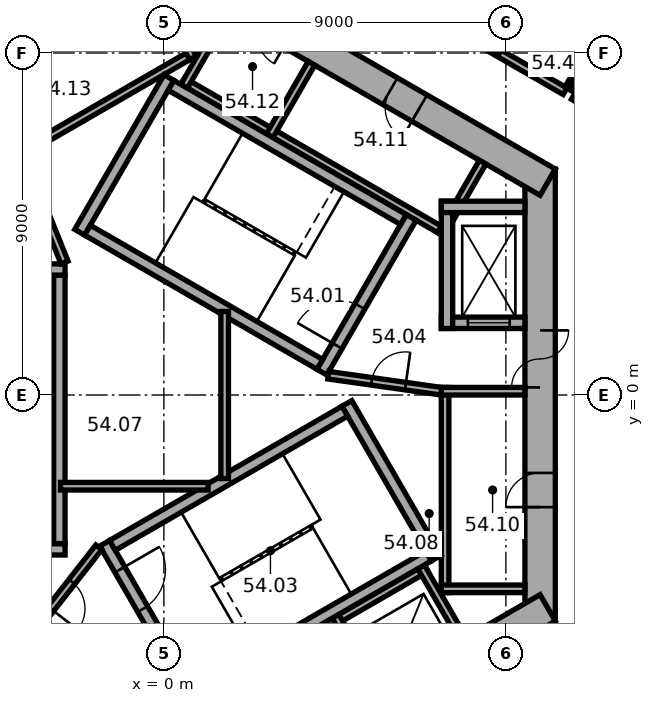
"""IFC4 building model, lengths in metres.
Left out: names, types, materials, properties, quantities, classifications, styles, units other than length and angle.
Written with IfcOpenShell. Run it as: python <this file> out.ifc"""

import sys

from ifc_helpers import new_model, si_unit, direction, frame, frame_2d, origin, place, context, subcontext, project, spatial, rectangle, extrude, element, fill, save


model = new_model("IFC4")
c1 = context("Model", 3, precision=1e-05, world=origin(), true_north=direction((0.0, 1.0)))
c2 = subcontext(c1, "Body", "Model", "MODEL_VIEW")
j1 = project(units=[si_unit("LENGTHUNIT", "METRE"), si_unit("PLANEANGLEUNIT", "RADIAN")], contexts=[c1])
p1 = place(None, origin())
s1 = spatial("IfcSite", under=j1, at=p1, CompositionType="ELEMENT")
p2 = place(p1, origin())
s2 = spatial("IfcBuilding", under=s1, at=p2, CompositionType="ELEMENT")
p3 = place(p2, frame((0.0, 0.0, 221.7)))
s3 = spatial("IfcBuildingStorey", under=s2, at=p3, CompositionType="ELEMENT", Elevation=221.7)
p4 = place(p3, frame((9.9, -5.947, 0.0), z_axis=(0.0, 0.0, 1.0), x_axis=(0.0, 1.0, 0.0)))
e1 = element("IfcWall", 1, at=p4, inside=s3, PredefinedType="SHEAR", context=c2, shape_type="SweptSolid", body=[
    extrude(rectangle(XDim=11.894, YDim=0.8, at=frame_2d((5.947, 0.0))), origin(), (0.0, 0.0, 1.0), 3.7),
])
p5 = place(p4, frame((6.147, 0.0, 0.0)))
e2 = element("IfcOpeningElement", 2, at=p5, cuts=e1, PredefinedType="OPENING", context=c2, shape_type="SweptSolid", body=[
    extrude(rectangle(XDim=1.5, YDim=2.1, at=frame_2d((0.75, 1.05))), frame((0.0, 0.41, 0.0), z_axis=(0.0, -1.0, 0.0), x_axis=(1.0, 0.0, 0.0)), (0.0, 0.0, 1.0), 0.82),
])
p6 = place(p4, frame((2.997, 0.0, 0.0)))
e3 = element("IfcOpeningElement", 3, at=p6, cuts=e1, PredefinedType="OPENING", context=c2, shape_type="SweptSolid", body=[
    extrude(rectangle(XDim=0.9, YDim=2.1, at=frame_2d((0.45, 1.05))), frame((0.0, 0.41, 0.0), z_axis=(0.0, -1.0, 0.0), x_axis=(1.0, 0.0, 0.0)), (0.0, 0.0, 1.0), 0.82),
])
p7 = place(p3, frame((10.1, 5.6, 0.0), z_axis=(0.0, 0.0, 1.0), x_axis=(-0.866023897231, 0.500002609418, 0.0)))
e4 = element("IfcWall", 4, at=p7, inside=s3, PredefinedType="SHEAR", context=c2, shape_type="SweptSolid", body=[
    extrude(rectangle(XDim=11.894, YDim=0.8, at=frame_2d((5.947, 0.0))), origin(), (0.0, 0.0, 1.0), 3.7),
])
p8 = place(p7, frame((3.897, 0.0, 0.0)))
e5 = element("IfcOpeningElement", 5, at=p8, cuts=e4, PredefinedType="OPENING", context=c2, shape_type="SweptSolid", body=[
    extrude(rectangle(XDim=0.9, YDim=2.1, at=frame_2d((0.45, 1.05))), frame((0.0, 0.41, 0.0), z_axis=(0.0, -1.0, 0.0), x_axis=(1.0, 0.0, 0.0)), (0.0, 0.0, 1.0), 0.82),
])
p9 = place(p7, frame((7.797, 0.0, 0.0)))
e6 = element("IfcOpeningElement", 6, at=p9, cuts=e4, PredefinedType="OPENING", context=c2, shape_type="SweptSolid", body=[
    extrude(rectangle(XDim=0.9, YDim=2.1, at=frame_2d((0.45, 1.05))), frame((0.0, 0.41, 0.0), z_axis=(0.0, -1.0, 0.0), x_axis=(1.0, 0.0, 0.0)), (0.0, 0.0, 1.0), 0.82),
])
p10 = place(p3, frame((0.2, 11.547, 0.0), z_axis=(0.0, 0.0, 1.0), x_axis=(-0.866023897231, -0.500002609418, 0.0)))
e7 = element("IfcWall", 7, at=p10, inside=s3, PredefinedType="SHEAR", context=c2, shape_type="SweptSolid", body=[
    extrude(rectangle(XDim=11.894, YDim=0.8, at=frame_2d((5.947, 0.0))), origin(), (0.0, 0.0, 1.0), 3.7),
])
p11 = place(p10, frame((6.147, 0.0, 0.0)))
e8 = element("IfcOpeningElement", 8, at=p11, cuts=e7, PredefinedType="OPENING", context=c2, shape_type="SweptSolid", body=[
    extrude(rectangle(XDim=1.5, YDim=2.1, at=frame_2d((0.75, 1.05))), frame((0.0, 0.41, 0.0), z_axis=(0.0, -1.0, 0.0), x_axis=(1.0, 0.0, 0.0)), (0.0, 0.0, 1.0), 0.82),
])
p12 = place(p10, frame((2.997, 0.0, 0.0)))
e9 = element("IfcOpeningElement", 9, at=p12, cuts=e7, PredefinedType="OPENING", context=c2, shape_type="SweptSolid", body=[
    extrude(rectangle(XDim=0.9, YDim=2.1, at=frame_2d((0.45, 1.05))), frame((0.0, 0.41, 0.0), z_axis=(0.0, -1.0, 0.0), x_axis=(1.0, 0.0, 0.0)), (0.0, 0.0, 1.0), 0.82),
])
p13 = place(p3, frame((-10.1, -5.6, 0.0), z_axis=(0.0, 0.0, 1.0), x_axis=(0.866023897231, -0.500002609418, 0.0)))
e10 = element("IfcWall", 10, at=p13, inside=s3, PredefinedType="SHEAR", context=c2, shape_type="SweptSolid", body=[
    extrude(rectangle(XDim=11.894, YDim=0.8, at=frame_2d((5.947, 0.0))), origin(), (0.0, 0.0, 1.0), 3.7),
])
p14 = place(p13, frame((6.147, 0.0, 0.0)))
e11 = element("IfcOpeningElement", 11, at=p14, cuts=e10, PredefinedType="OPENING", context=c2, shape_type="SweptSolid", body=[
    extrude(rectangle(XDim=1.5, YDim=2.1, at=frame_2d((0.75, 1.05))), frame((0.0, 0.41, 0.0), z_axis=(0.0, -1.0, 0.0), x_axis=(1.0, 0.0, 0.0)), (0.0, 0.0, 1.0), 0.82),
])
p15 = place(p13, frame((1.597, 0.0, 0.0)))
e12 = element("IfcOpeningElement", 12, at=p15, cuts=e10, PredefinedType="OPENING", context=c2, shape_type="SweptSolid", body=[
    extrude(rectangle(XDim=1.1, YDim=2.1, at=frame_2d((0.55, 1.05))), frame((0.0, 0.41, 0.0), z_axis=(0.0, -1.0, 0.0), x_axis=(1.0, 0.0, 0.0)), (0.0, 0.0, 1.0), 0.82),
])
p16 = place(p13, frame((4.197, 0.0, 0.0)))
e13 = element("IfcOpeningElement", 13, at=p16, cuts=e10, PredefinedType="OPENING", context=c2, shape_type="SweptSolid", body=[
    extrude(rectangle(XDim=1.1, YDim=2.1, at=frame_2d((0.55, 1.05))), frame((0.0, 0.41, 0.0), z_axis=(0.0, -1.0, 0.0), x_axis=(1.0, 0.0, 0.0)), (0.0, 0.0, 1.0), 0.82),
])
p17 = place(p3, frame((-0.2, -11.547, 0.0), z_axis=(0.0, 0.0, 1.0), x_axis=(0.866023897231, 0.500002609418, 0.0)))
e14 = element("IfcWall", 14, at=p17, inside=s3, PredefinedType="SHEAR", context=c2, shape_type="SweptSolid", body=[
    extrude(rectangle(XDim=11.894, YDim=0.8, at=frame_2d((5.947, 0.0))), origin(), (0.0, 0.0, 1.0), 3.7),
])
p18 = place(p17, frame((2.497, 0.0, 0.0)))
e15 = element("IfcOpeningElement", 15, at=p18, cuts=e14, PredefinedType="OPENING", context=c2, shape_type="SweptSolid", body=[
    extrude(rectangle(XDim=1.1, YDim=2.1, at=frame_2d((0.55, 1.05))), frame((0.0, 0.41, 0.0), z_axis=(0.0, -1.0, 0.0), x_axis=(1.0, 0.0, 0.0)), (0.0, 0.0, 1.0), 0.82),
])
p19 = place(p17, frame((5.097, 0.0, 0.0)))
e16 = element("IfcOpeningElement", 16, at=p19, cuts=e14, PredefinedType="OPENING", context=c2, shape_type="SweptSolid", body=[
    extrude(rectangle(XDim=1.1, YDim=2.1, at=frame_2d((0.55, 1.05))), frame((0.0, 0.41, 0.0), z_axis=(0.0, -1.0, 0.0), x_axis=(1.0, 0.0, 0.0)), (0.0, 0.0, 1.0), 0.82),
])
p20 = place(p17, frame((7.697, 0.0, 0.0)))
e17 = element("IfcOpeningElement", 17, at=p20, cuts=e14, PredefinedType="OPENING", context=c2, shape_type="SweptSolid", body=[
    extrude(rectangle(XDim=1.1, YDim=2.1, at=frame_2d((0.55, 1.05))), frame((0.0, 0.41, 0.0), z_axis=(0.0, -1.0, 0.0), x_axis=(1.0, 0.0, 0.0)), (0.0, 0.0, 1.0), 0.82),
])
p21 = place(p3, frame((7.4, -5.2, 0.0), z_axis=(0.0, 0.0, 1.0), x_axis=(0.0, 1.0, 0.0)))
e18 = element("IfcWall", 18, at=p21, inside=s3, PredefinedType="PARTITIONING", context=c2, shape_type="SweptSolid", body=[
    extrude(rectangle(XDim=5.4, YDim=0.2, at=frame_2d((2.7, 0.0))), origin(), (0.0, 0.0, 1.0), 3.42),
])
for number, where, z_axis, x_axis in (
    (19, (7.3, -5.1, 0.0), (0.0, 0.0, 1.0), (1.0, 0.0, 0.0)),
    (20, (7.3, 0.1, 0.0), (0.0, 0.0, 1.0), (1.0, 0.0, 0.0)),
):
    element("IfcWall", number, at=place(p3, frame(where, z_axis=z_axis, x_axis=x_axis)), inside=s3, PredefinedType="PARTITIONING", context=c2, shape_type="SweptSolid", body=[
        extrude(rectangle(XDim=2.2, YDim=0.2, at=frame_2d((1.1, 0.0))), origin(), (0.0, 0.0, 1.0), 3.42),
    ])
p22 = place(p3, frame((7.424, 4.259, 0.0), z_axis=(0.0, 0.0, 1.0), x_axis=(-0.866026010844, 0.49999894854, 0.0)))
e21 = element("IfcWall", 21, at=p22, inside=s3, PredefinedType="PARTITIONING", context=c2, shape_type="SweptSolid", body=[
    extrude(rectangle(XDim=8.0, YDim=0.2, at=frame_2d((4.0, 0.0))), origin(), (0.0, 0.0, 1.0), 3.42),
])
for number, where, z_axis, x_axis in (
    (22, (7.287, 4.222, 0.0), (0.0, 0.0, 1.0), (0.5, 0.866, 0.0)),
    (23, (2.784, 6.822, 0.0), (0.0, 0.0, 1.0), (0.5, 0.866, 0.0)),
    (24, (0.532, 8.122, 0.0), (0.0, 0.0, 1.0), (0.5, 0.866, 0.0)),
):
    element("IfcWall", number, at=place(p3, frame(where, z_axis=z_axis, x_axis=x_axis)), inside=s3, PredefinedType="PARTITIONING", context=c2, shape_type="SweptSolid", body=[
        extrude(rectangle(XDim=2.2, YDim=0.2, at=frame_2d((1.1, 0.0))), origin(), (0.0, 0.0, 1.0), 3.42),
    ])
p23 = place(p3, frame((0.803, 9.009, 0.0), z_axis=(0.0, 0.0, 1.0), x_axis=(-0.866028230842, -0.499995103361, 0.0)))
e25 = element("IfcWall", 25, at=p23, inside=s3, PredefinedType="PARTITIONING", context=c2, shape_type="SweptSolid", body=[
    extrude(rectangle(XDim=5.4, YDim=0.2, at=frame_2d((2.7, 0.0))), origin(), (0.0, 0.0, 1.0), 3.42),
])
p24 = place(p3, frame((0.767, 8.872, 0.0), z_axis=(0.0, 0.0, 1.0), x_axis=(-0.499994660107, 0.866028486751, 0.0)))
e26 = element("IfcWall", 26, at=p24, inside=s3, PredefinedType="PARTITIONING", context=c2, shape_type="SweptSolid", body=[
    extrude(rectangle(XDim=2.2, YDim=0.2, at=frame_2d((1.1, 0.0))), origin(), (0.0, 0.0, 1.0), 3.42),
])
p25 = place(p3, frame((-0.024, -8.559, 0.0), z_axis=(0.0, 0.0, 1.0), x_axis=(0.866026010844, 0.49999894854, 0.0)))
e27 = element("IfcWall", 27, at=p25, inside=s3, PredefinedType="PARTITIONING", context=c2, shape_type="SweptSolid", body=[
    extrude(rectangle(XDim=8.0, YDim=0.2, at=frame_2d((4.0, 0.0))), origin(), (0.0, 0.0, 1.0), 3.42),
])
for number, where, z_axis, x_axis in (
    (28, (4.516, -5.822, 0.0), (0.0, 0.0, 1.0), (0.5, -0.866, 0.0)),
    (29, (6.768, -4.522, 0.0), (0.0, 0.0, 1.0), (0.5, -0.866, 0.0)),
):
    element("IfcWall", number, at=place(p3, frame(where, z_axis=z_axis, x_axis=x_axis)), inside=s3, PredefinedType="PARTITIONING", context=c2, shape_type="SweptSolid", body=[
        extrude(rectangle(XDim=2.2, YDim=0.2, at=frame_2d((1.1, 0.0))), origin(), (0.0, 0.0, 1.0), 3.42),
    ])
p26 = place(p3, frame((4.158, 0.602, 0.0), z_axis=(0.0, 0.0, 1.0), x_axis=(0.499977259774, 0.866038532462, 0.0)))
e30 = element("IfcWall", 30, at=p26, inside=s3, PredefinedType="SHEAR", context=c2, shape_type="SweptSolid", body=[
    extrude(rectangle(XDim=4.7, YDim=0.3, at=frame_2d((2.35, 0.0))), origin(), (0.0, 0.0, 1.0), 3.42),
])
p27 = place(p26, frame((0.8, 0.0, 0.0)))
e31 = element("IfcOpeningElement", 31, at=p27, cuts=e30, PredefinedType="OPENING", context=c2, shape_type="SweptSolid", body=[
    extrude(rectangle(XDim=1.2, YDim=2.1, at=frame_2d((0.6, 1.05))), frame((0.0, 0.16, 0.0), z_axis=(0.0, -1.0, 0.0), x_axis=(1.0, 0.0, 0.0)), (0.0, 0.0, 1.0), 0.32),
])
p28 = place(p3, frame((-2.216, 4.282, 0.0), z_axis=(0.0, 0.0, 1.0), x_axis=(0.499977259774, 0.866038532462, 0.0)))
e32 = element("IfcWall", 32, at=p28, inside=s3, PredefinedType="SHEAR", context=c2, shape_type="SweptSolid", body=[
    extrude(rectangle(XDim=4.7, YDim=0.3, at=frame_2d((2.35, 0.0))), origin(), (0.0, 0.0, 1.0), 3.42),
])
for number, where, z_axis, x_axis in (
    (33, (4.103, 0.807, 0.0), (0.0, 0.0, 1.0), (-0.866, 0.5, 0.0)),
    (34, (6.303, 4.617, 0.0), (0.0, 0.0, 1.0), (-0.866, 0.5, 0.0)),
):
    element("IfcWall", number, at=place(p3, frame(where, z_axis=z_axis, x_axis=x_axis)), inside=s3, PredefinedType="SHEAR", context=c2, shape_type="SweptSolid", body=[
        extrude(rectangle(XDim=7.06, YDim=0.3, at=frame_2d((3.53, 0.0))), origin(), (0.0, 0.0, 1.0), 3.42),
    ])
p29 = place(p3, frame((-2.6, 3.3, 0.0), z_axis=(0.0, 0.0, 1.0), x_axis=(-1.0, 0.0, 0.0)))
e35 = element("IfcWall", 35, at=p29, inside=s3, PredefinedType="SHEAR", context=c2, shape_type="SweptSolid", body=[
    extrude(rectangle(XDim=4.7, YDim=0.3, at=frame_2d((2.35, 0.0))), origin(), (0.0, 0.0, 1.0), 3.42),
])
p30 = place(p29, frame((0.8, 0.0, 0.0)))
e36 = element("IfcOpeningElement", 36, at=p30, cuts=e35, PredefinedType="OPENING", context=c2, shape_type="SweptSolid", body=[
    extrude(rectangle(XDim=1.2, YDim=2.1, at=frame_2d((0.6, 1.05))), frame((0.0, 0.16, 0.0), z_axis=(0.0, -1.0, 0.0), x_axis=(1.0, 0.0, 0.0)), (0.0, 0.0, 1.0), 0.32),
])
p31 = place(p3, frame((-2.6, -4.06, 0.0), z_axis=(0.0, 0.0, 1.0), x_axis=(-1.0, 0.0, 0.0)))
e37 = element("IfcWall", 37, at=p31, inside=s3, PredefinedType="SHEAR", context=c2, shape_type="SweptSolid", body=[
    extrude(rectangle(XDim=4.7, YDim=0.3, at=frame_2d((2.35, 0.0))), origin(), (0.0, 0.0, 1.0), 3.42),
])
p32 = place(p3, frame((-2.75, 3.15, 0.0), z_axis=(0.0, 0.0, 1.0), x_axis=(0.0, -1.0, 0.0)))
e38 = element("IfcWall", 38, at=p32, inside=s3, PredefinedType="SHEAR", context=c2, shape_type="SweptSolid", body=[
    extrude(rectangle(XDim=7.06, YDim=0.3, at=frame_2d((3.53, 0.0))), origin(), (0.0, 0.0, 1.0), 3.42),
])
p33 = place(p3, frame((-1.558, -3.902, 0.0), z_axis=(0.0, 0.0, 1.0), x_axis=(0.499977259774, -0.866038532462, 0.0)))
e39 = element("IfcWall", 39, at=p33, inside=s3, PredefinedType="SHEAR", context=c2, shape_type="SweptSolid", body=[
    extrude(rectangle(XDim=4.7, YDim=0.3, at=frame_2d((2.35, 0.0))), origin(), (0.0, 0.0, 1.0), 3.42),
])
p34 = place(p33, frame((0.8, 0.0, 0.0)))
e40 = element("IfcOpeningElement", 40, at=p34, cuts=e39, PredefinedType="OPENING", context=c2, shape_type="SweptSolid", body=[
    extrude(rectangle(XDim=1.2, YDim=2.1, at=frame_2d((0.6, 1.05))), frame((0.0, 0.16, 0.0), z_axis=(0.0, -1.0, 0.0), x_axis=(1.0, 0.0, 0.0)), (0.0, 0.0, 1.0), 0.32),
])
p35 = place(p3, frame((4.816, -0.222, 0.0), z_axis=(0.0, 0.0, 1.0), x_axis=(0.499977259774, -0.866038532462, 0.0)))
e41 = element("IfcWall", 41, at=p35, inside=s3, PredefinedType="SHEAR", context=c2, shape_type="SweptSolid", body=[
    extrude(rectangle(XDim=4.7, YDim=0.3, at=frame_2d((2.35, 0.0))), origin(), (0.0, 0.0, 1.0), 3.42),
])
for number, where, z_axis, x_axis in (
    (42, (-1.353, -3.957, 0.0), (0.0, 0.0, 1.0), (0.866, 0.5, 0.0)),
    (43, (0.847, -7.767, 0.0), (0.0, 0.0, 1.0), (0.866, 0.5, 0.0)),
):
    element("IfcWall", number, at=place(p3, frame(where, z_axis=z_axis, x_axis=x_axis)), inside=s3, PredefinedType="SHEAR", context=c2, shape_type="SweptSolid", body=[
        extrude(rectangle(XDim=7.06, YDim=0.3, at=frame_2d((3.53, 0.0))), origin(), (0.0, 0.0, 1.0), 3.42),
    ])
p36 = place(p3, frame((7.3, 1.9, 0.0), z_axis=(0.0, 0.0, 1.0), x_axis=(1.0, 0.0, 0.0)))
e44 = element("IfcWall", 44, at=p36, inside=s3, PredefinedType="SHEAR", context=c2, shape_type="SweptSolid", body=[
    extrude(rectangle(XDim=2.2, YDim=0.3, at=frame_2d((1.1, 0.0))), origin(), (0.0, 0.0, 1.0), 3.42),
])
p37 = place(p36, frame((0.7, 0.0, 0.0)))
e45 = element("IfcOpeningElement", 45, at=p37, cuts=e44, PredefinedType="OPENING", context=c2, shape_type="SweptSolid", body=[
    extrude(rectangle(XDim=1.1, YDim=2.1, at=frame_2d((0.55, 1.05))), frame((0.0, 0.16, 0.0), z_axis=(0.0, -1.0, 0.0), x_axis=(1.0, 0.0, 0.0)), (0.0, 0.0, 1.0), 0.32),
])
p38 = place(p3, frame((7.45, 1.75, 0.0), z_axis=(0.0, 0.0, 1.0), x_axis=(0.0, 1.0, 0.0)))
e46 = element("IfcWall", 46, at=p38, inside=s3, PredefinedType="SHEAR", context=c2, shape_type="SweptSolid", body=[
    extrude(rectangle(XDim=3.35, YDim=0.3, at=frame_2d((1.675, 0.0))), origin(), (0.0, 0.0, 1.0), 3.42),
])
p39 = place(p3, frame((7.3, 4.95, 0.0), z_axis=(0.0, 0.0, 1.0), x_axis=(1.0, 0.0, 0.0)))
e47 = element("IfcWall", 47, at=p39, inside=s3, PredefinedType="SHEAR", context=c2, shape_type="SweptSolid", body=[
    extrude(rectangle(XDim=2.2, YDim=0.3, at=frame_2d((1.1, 0.0))), origin(), (0.0, 0.0, 1.0), 3.42),
])
p40 = place(p3, frame((4.327, 0.521, 0.0), z_axis=(0.0, 0.0, 1.0), x_axis=(0.990124376366, -0.14019172346, 0.0)))
e48 = element("IfcWall", 48, at=p40, inside=s3, PredefinedType="PARTITIONING", context=c2, shape_type="SweptSolid", body=[
    extrude(rectangle(XDim=3.002, YDim=0.2, at=frame_2d((1.501, 0.0))), origin(), (0.0, 0.0, 1.0), 3.42),
])
p41 = place(p40, frame((1.15, 0.0, 0.0)))
e49 = element("IfcOpeningElement", 49, at=p41, cuts=e48, PredefinedType="OPENING", context=c2, shape_type="SweptSolid", body=[
    extrude(rectangle(XDim=0.9, YDim=2.1, at=frame_2d((0.45, 1.05))), frame((0.0, 0.11, 0.0), z_axis=(0.0, -1.0, 0.0), x_axis=(1.0, 0.0, 0.0)), (0.0, 0.0, 1.0), 0.22),
])
p42 = place(p3, frame((-2.615, 3.487, 0.0), z_axis=(0.0, 0.0, 1.0), x_axis=(-0.373576831041, 0.92759924068, 0.0)))
e50 = element("IfcWall", 50, at=p42, inside=s3, PredefinedType="PARTITIONING", context=c2, shape_type="SweptSolid", body=[
    extrude(rectangle(XDim=3.002, YDim=0.2, at=frame_2d((1.501, 0.0))), origin(), (0.0, 0.0, 1.0), 3.42),
])
p43 = place(p42, frame((1.15, 0.0, 0.0)))
e51 = element("IfcOpeningElement", 51, at=p43, cuts=e50, PredefinedType="OPENING", context=c2, shape_type="SweptSolid", body=[
    extrude(rectangle(XDim=0.9, YDim=2.1, at=frame_2d((0.45, 1.05))), frame((0.0, 0.11, 0.0), z_axis=(0.0, -1.0, 0.0), x_axis=(1.0, 0.0, 0.0)), (0.0, 0.0, 1.0), 0.22),
])
p44 = place(p3, frame((-1.712, -4.008, 0.0), z_axis=(0.0, 0.0, 1.0), x_axis=(-0.616549420702, -0.787316208287, 0.0)))
e52 = element("IfcWall", 52, at=p44, inside=s3, PredefinedType="PARTITIONING", context=c2, shape_type="SweptSolid", body=[
    extrude(rectangle(XDim=3.002, YDim=0.2, at=frame_2d((1.501, 0.0))), origin(), (0.0, 0.0, 1.0), 3.42),
])
p45 = place(p44, frame((1.15, 0.0, 0.0)))
e53 = element("IfcOpeningElement", 53, at=p45, cuts=e52, PredefinedType="OPENING", context=c2, shape_type="SweptSolid", body=[
    extrude(rectangle(XDim=0.9, YDim=2.1, at=frame_2d((0.45, 1.05))), frame((0.0, 0.11, 0.0), z_axis=(0.0, -1.0, 0.0), x_axis=(1.0, 0.0, 0.0)), (0.0, 0.0, 1.0), 0.22),
])
p46 = place(p3, frame((-2.72, -2.4, 0.0), z_axis=(0.0, 0.0, 1.0), x_axis=(1.0, 0.0, 0.0)))
e54 = element("IfcWall", 54, at=p46, inside=s3, PredefinedType="PARTITIONING", context=c2, shape_type="SweptSolid", body=[
    extrude(rectangle(XDim=3.883, YDim=0.2, at=frame_2d((1.941, 0.0))), origin(), (0.0, 0.0, 1.0), 3.42),
])
p47 = place(p3, frame((1.6, -2.198, 0.0), z_axis=(0.0, 0.0, 1.0), x_axis=(0.0, 1.0, 0.0)))
e55 = element("IfcWall", 55, at=p47, inside=s3, PredefinedType="PARTITIONING", context=c2, shape_type="SweptSolid", body=[
    extrude(rectangle(XDim=4.397, YDim=0.2, at=frame_2d((2.198, 0.0))), origin(), (0.0, 0.0, 1.0), 3.42),
])
p48 = place(p3, frame((8.721, 9.052, 0.0), z_axis=(0.0, 0.0, 1.0), x_axis=(-0.866028125821, 0.499995285264, 0.0)))
e56 = element("IfcWall", 56, at=p48, inside=s3, PredefinedType="PARTITIONING", context=c2, shape_type="SweptSolid", body=[
    extrude(rectangle(XDim=8.934, YDim=0.2, at=frame_2d((4.467, 0.0))), origin(), (0.0, 0.0, 1.0), 3.42),
])
p49 = place(p48, frame((5.05, 0.0, 0.0)))
e57 = element("IfcOpeningElement", 57, at=p49, cuts=e56, PredefinedType="OPENING", context=c2, shape_type="SweptSolid", body=[
    extrude(rectangle(XDim=1.0, YDim=2.1, at=frame_2d((0.5, 1.05))), frame((0.0, 0.11, 0.0), z_axis=(0.0, -1.0, 0.0), x_axis=(1.0, 0.0, 0.0)), (0.0, 0.0, 1.0), 0.22),
])
p50 = place(p3, frame((10.558, 7.992, 0.0), z_axis=(0.0, 0.0, 1.0), x_axis=(-0.866041268327, 0.499972520799, 0.0)))
e58 = element("IfcWall", 58, at=p50, inside=s3, PredefinedType="PARTITIONING", context=c2, shape_type="SweptSolid", body=[
    extrude(rectangle(XDim=2.0, YDim=0.2, at=frame_2d((1.0, 0.0))), origin(), (0.0, 0.0, 1.0), 3.42),
])
p51 = place(p3, frame((11.25, 7.592, 0.0), z_axis=(0.0, 0.0, 1.0), x_axis=(-0.865993292597, 0.500055614084, 0.0)))
e59 = element("IfcWall", 59, at=p51, inside=s3, PredefinedType="PARTITIONING", context=c2, shape_type="SweptSolid", body=[
    extrude(rectangle(XDim=0.55, YDim=0.2, at=frame_2d((0.275, 0.0))), origin(), (0.0, 0.0, 1.0), 3.42),
])
p52 = place(p3, frame((11.291, 9.263, 0.0), z_axis=(0.0, 0.0, 1.0), x_axis=(-0.500036664704, -0.866004234373, 0.0)))
e60 = element("IfcWall", 60, at=p52, inside=s3, PredefinedType="PARTITIONING", context=c2, shape_type="SweptSolid", body=[
    extrude(rectangle(XDim=1.368, YDim=0.12, at=frame_2d((0.684, 0.0))), origin(), (0.0, 0.0, 1.0), 3.42),
])
p53 = place(p3, frame((14.211, 14.76, 0.0), z_axis=(0.0, 0.0, 1.0), x_axis=(-0.446198490295, -0.89493402397, 0.0)))
e61 = element("IfcWall", 61, at=p53, inside=s3, PredefinedType="PARTITIONING", context=c2, shape_type="SweptSolid", body=[
    extrude(rectangle(XDim=7.602, YDim=0.2, at=frame_2d((3.801, 0.0))), origin(), (0.0, 0.0, 1.0), 3.42),
])
p54 = place(p5, origin())
e62 = element("IfcDoor", 62, at=p54, inside=s3, OperationType="DOUBLE_DOOR_SINGLE_SWING", PredefinedType="DOOR", context=c2, shape_type="SweptSolid", body=[
    extrude(rectangle(XDim=1.5, YDim=2.1, at=frame_2d((0.75, 1.05))), frame((0.0, 0.025, 0.0), z_axis=(0.0, -1.0, 0.0), x_axis=(1.0, 0.0, 0.0)), (0.0, 0.0, 1.0), 0.05),
])
fill(e2, e62)
p55 = place(p27, origin())
e63 = element("IfcDoor", 63, at=p55, inside=s3, OperationType="SINGLE_SWING_RIGHT", PredefinedType="DOOR", context=c2, shape_type="SweptSolid", body=[
    extrude(rectangle(XDim=1.2, YDim=2.1, at=frame_2d((0.6, 1.05))), frame((0.0, 0.025, 0.0), z_axis=(0.0, -1.0, 0.0), x_axis=(1.0, 0.0, 0.0)), (0.0, 0.0, 1.0), 0.05),
])
fill(e31, e63)
p56 = place(p34, origin())
e64 = element("IfcDoor", 64, at=p56, inside=s3, OperationType="SINGLE_SWING_RIGHT", PredefinedType="DOOR", context=c2, shape_type="SweptSolid", body=[
    extrude(rectangle(XDim=1.2, YDim=2.1, at=frame_2d((0.6, 1.05))), frame((0.0, 0.025, 0.0), z_axis=(0.0, -1.0, 0.0), x_axis=(1.0, 0.0, 0.0)), (0.0, 0.0, 1.0), 0.05),
])
fill(e40, e64)
p57 = place(p41, origin())
e65 = element("IfcDoor", 65, at=p57, inside=s3, OperationType="SINGLE_SWING_LEFT", PredefinedType="DOOR", context=c2, shape_type="SweptSolid", body=[
    extrude(rectangle(XDim=0.9, YDim=2.1, at=frame_2d((0.45, 1.05))), frame((0.0, 0.025, 0.0), z_axis=(0.0, -1.0, 0.0), x_axis=(1.0, 0.0, 0.0)), (0.0, 0.0, 1.0), 0.05),
])
fill(e49, e65)
p58 = place(p45, origin())
e66 = element("IfcDoor", 66, at=p58, inside=s3, OperationType="SINGLE_SWING_LEFT", PredefinedType="DOOR", context=c2, shape_type="SweptSolid", body=[
    extrude(rectangle(XDim=0.9, YDim=2.1, at=frame_2d((0.45, 1.05))), frame((0.0, 0.025, 0.0), z_axis=(0.0, -1.0, 0.0), x_axis=(1.0, 0.0, 0.0)), (0.0, 0.0, 1.0), 0.05),
])
fill(e53, e66)
p59 = place(p6, origin())
e67 = element("IfcDoor", 67, at=p59, inside=s3, OperationType="SINGLE_SWING_LEFT", PredefinedType="DOOR", context=c2, shape_type="SweptSolid", body=[
    extrude(rectangle(XDim=0.9, YDim=2.1, at=frame_2d((0.45, 1.05))), frame((0.0, 0.025, 0.0), z_axis=(0.0, -1.0, 0.0), x_axis=(1.0, 0.0, 0.0)), (0.0, 0.0, 1.0), 0.05),
])
fill(e3, e67)
p60 = place(p8, origin())
e68 = element("IfcDoor", 68, at=p60, inside=s3, OperationType="SINGLE_SWING_LEFT", PredefinedType="DOOR", context=c2, shape_type="SweptSolid", body=[
    extrude(rectangle(XDim=0.9, YDim=2.1, at=frame_2d((0.45, 1.05))), frame((0.0, 0.025, 0.0), z_axis=(0.0, -1.0, 0.0), x_axis=(1.0, 0.0, 0.0)), (0.0, 0.0, 1.0), 0.05),
])
fill(e5, e68)
p61 = place(p37, origin())
e69 = element("IfcDoor", 69, at=p61, inside=s3, OperationType="DOUBLE_DOOR_SLIDING", PredefinedType="DOOR", context=c2, shape_type="SweptSolid", body=[
    extrude(rectangle(XDim=1.1, YDim=2.1, at=frame_2d((0.55, 1.05))), frame((0.0, 0.025, 0.0), z_axis=(0.0, -1.0, 0.0), x_axis=(1.0, 0.0, 0.0)), (0.0, 0.0, 1.0), 0.05),
])
fill(e45, e69)
save(model, sys.argv[1])
